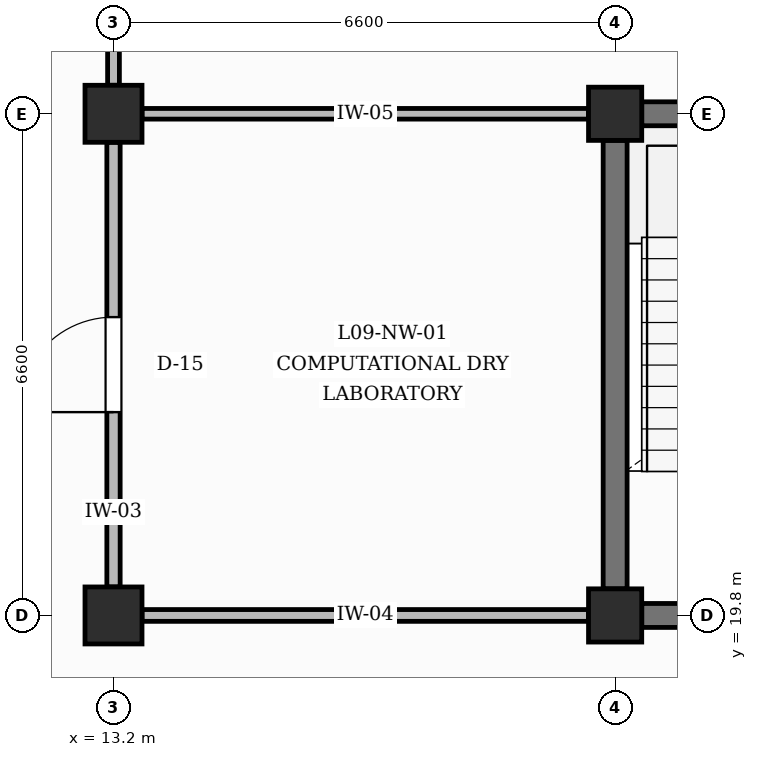
"""IFC4 building model, lengths in metres.
Left out: names, types, materials, properties, quantities, classifications, styles, units other than length and angle.
Written with IfcOpenShell. Run it as: python <this file> out.ifc"""

import sys

from ifc_helpers import new_model, si_unit, direction, frame, frame_2d, origin, origin_2d, place, context, subcontext, project, spatial, rectangle, extrude, element, fill, save


model = new_model("IFC4")
c1 = context("Model", 3, precision=1e-05, world=origin(), true_north=direction((0.0, 1.0)))
c2 = subcontext(c1, "Body", "Model", "MODEL_VIEW")
j1 = project(units=[si_unit("LENGTHUNIT", "METRE"), si_unit("PLANEANGLEUNIT", "RADIAN")], contexts=[c1])
p1 = place(None, origin())
s1 = spatial("IfcSite", under=j1, at=p1, CompositionType="ELEMENT")
p2 = place(p1, origin())
s2 = spatial("IfcBuilding", under=s1, at=p2, CompositionType="ELEMENT")
p3 = place(p2, frame((0.0, 0.0, 39.6)))
s3 = spatial("IfcBuildingStorey", under=s2, at=p3, CompositionType="ELEMENT", Elevation=39.6)
for number, where, z_axis, x_axis in (
    (1, (13.2, 19.8, 0.0), (0.0, 0.0, 1.0), (1.0, 0.0, 0.0)),
    (2, (13.2, 26.4, 0.0), (0.0, 0.0, 1.0), (1.0, 0.0, 0.0)),
):
    element("IfcColumn", number, at=place(p3, frame(where, z_axis=z_axis, x_axis=x_axis)), inside=s3, PredefinedType="COLUMN", context=c2, shape_type="SweptSolid", body=[
        extrude(rectangle(XDim=0.75, YDim=0.75, at=origin_2d()), origin(), (0.0, 0.0, 1.0), 4.2),
    ])
for number, where, z_axis, x_axis in (
    (3, (19.8, 19.8, 0.0), (0.0, 0.0, 1.0), (1.0, 0.0, 0.0)),
    (4, (19.8, 26.4, 0.0), (0.0, 0.0, 1.0), (1.0, 0.0, 0.0)),
):
    element("IfcColumn", number, at=place(p3, frame(where, z_axis=z_axis, x_axis=x_axis)), inside=s3, PredefinedType="COLUMN", context=c2, shape_type="SweptSolid", body=[
        extrude(rectangle(XDim=0.7, YDim=0.7, at=origin_2d()), origin(), (0.0, 0.0, 1.0), 4.2),
    ])
p4 = place(p3, frame((20.15, 19.8, 0.0), z_axis=(0.0, 0.0, 1.0), x_axis=(1.0, 0.0, 0.0)))
e5 = element("IfcWall", 5, at=p4, inside=s3, PredefinedType="SHEAR", context=c2, shape_type="SweptSolid", body=[
    extrude(rectangle(XDim=5.9, YDim=0.315, at=frame_2d((2.95, 0.0))), origin(), (0.0, 0.0, 1.0), 3.29),
])
p5 = place(p4, frame((2.4, 0.0, 0.0)))
e6 = element("IfcOpeningElement", 6, at=p5, cuts=e5, PredefinedType="OPENING", context=c2, shape_type="SweptSolid", body=[
    extrude(rectangle(XDim=1.1, YDim=2.15, at=frame_2d((0.55, 1.075))), frame((0.0, 0.167, 0.0), z_axis=(0.0, -1.0, 0.0), x_axis=(1.0, 0.0, 0.0)), (0.0, 0.0, 1.0), 0.335),
])
for number, where, z_axis, x_axis in (
    (7, (20.15, 26.4, 0.0), (0.0, 0.0, 1.0), (1.0, 0.0, 0.0)),
    (8, (19.8, 20.15, 0.0), (0.0, 0.0, 1.0), (0.0, 1.0, 0.0)),
):
    element("IfcWall", number, at=place(p3, frame(where, z_axis=z_axis, x_axis=x_axis)), inside=s3, PredefinedType="SHEAR", context=c2, shape_type="SweptSolid", body=[
        extrude(rectangle(XDim=5.9, YDim=0.315, at=frame_2d((2.95, 0.0))), origin(), (0.0, 0.0, 1.0), 3.29),
    ])
p6 = place(p3, frame((13.2, 20.175, 0.0), z_axis=(0.0, 0.0, 1.0), x_axis=(0.0, 1.0, 0.0)))
e9 = element("IfcWall", 9, at=p6, inside=s3, PredefinedType="PARTITIONING", context=c2, shape_type="SweptSolid", body=[
    extrude(rectangle(XDim=5.85, YDim=0.175, at=frame_2d((2.925, 0.0))), origin(), (0.0, 0.0, 1.0), 3.29),
])
p7 = place(p6, frame((2.3, 0.0, 0.0)))
e10 = element("IfcOpeningElement", 10, at=p7, cuts=e9, PredefinedType="OPENING", context=c2, shape_type="SweptSolid", body=[
    extrude(rectangle(XDim=1.25, YDim=2.25, at=frame_2d((0.625, 1.125))), frame((0.0, 0.097, 0.0), z_axis=(0.0, -1.0, 0.0), x_axis=(1.0, 0.0, 0.0)), (0.0, 0.0, 1.0), 0.195),
])
p8 = place(p3, frame((13.2, 26.775, 0.0), z_axis=(0.0, 0.0, 1.0), x_axis=(0.0, 1.0, 0.0)))
e11 = element("IfcWall", 11, at=p8, inside=s3, PredefinedType="PARTITIONING", context=c2, shape_type="SweptSolid", body=[
    extrude(rectangle(XDim=5.875, YDim=0.155, at=frame_2d((2.938, 0.0))), origin(), (0.0, 0.0, 1.0), 3.29),
])
p9 = place(p8, frame((2.4, 0.0, 0.0)))
e12 = element("IfcOpeningElement", 12, at=p9, cuts=e11, PredefinedType="OPENING", context=c2, shape_type="SweptSolid", body=[
    extrude(rectangle(XDim=1.05, YDim=2.15, at=frame_2d((0.525, 1.075))), frame((0.0, 0.087, 0.0), z_axis=(0.0, -1.0, 0.0), x_axis=(1.0, 0.0, 0.0)), (0.0, 0.0, 1.0), 0.175),
])
p10 = place(p3, frame((13.575, 19.8, 0.0), z_axis=(0.0, 0.0, 1.0), x_axis=(1.0, 0.0, 0.0)))
e13 = element("IfcWall", 13, at=p10, inside=s3, PredefinedType="PARTITIONING", context=c2, shape_type="SweptSolid", body=[
    extrude(rectangle(XDim=5.875, YDim=0.155, at=frame_2d((2.938, 0.0))), origin(), (0.0, 0.0, 1.0), 3.29),
])
p11 = place(p3, frame((13.575, 26.4, 0.0), z_axis=(0.0, 0.0, 1.0), x_axis=(1.0, 0.0, 0.0)))
e14 = element("IfcWall", 14, at=p11, inside=s3, PredefinedType="PARTITIONING", context=c2, shape_type="SweptSolid", body=[
    extrude(rectangle(XDim=5.875, YDim=0.14, at=frame_2d((2.938, 0.0))), origin(), (0.0, 0.0, 1.0), 3.29),
])
p12 = place(p7, origin())
e15 = element("IfcDoor", 15, at=p12, inside=s3, OperationType="SINGLE_SWING_LEFT", PredefinedType="DOOR", context=c2, shape_type="SweptSolid", body=[
    extrude(rectangle(XDim=1.25, YDim=2.25, at=frame_2d((0.625, 1.125))), frame((0.0, 0.025, 0.0), z_axis=(0.0, -1.0, 0.0), x_axis=(1.0, 0.0, 0.0)), (0.0, 0.0, 1.0), 0.05),
])
fill(e10, e15)
save(model, sys.argv[1])
